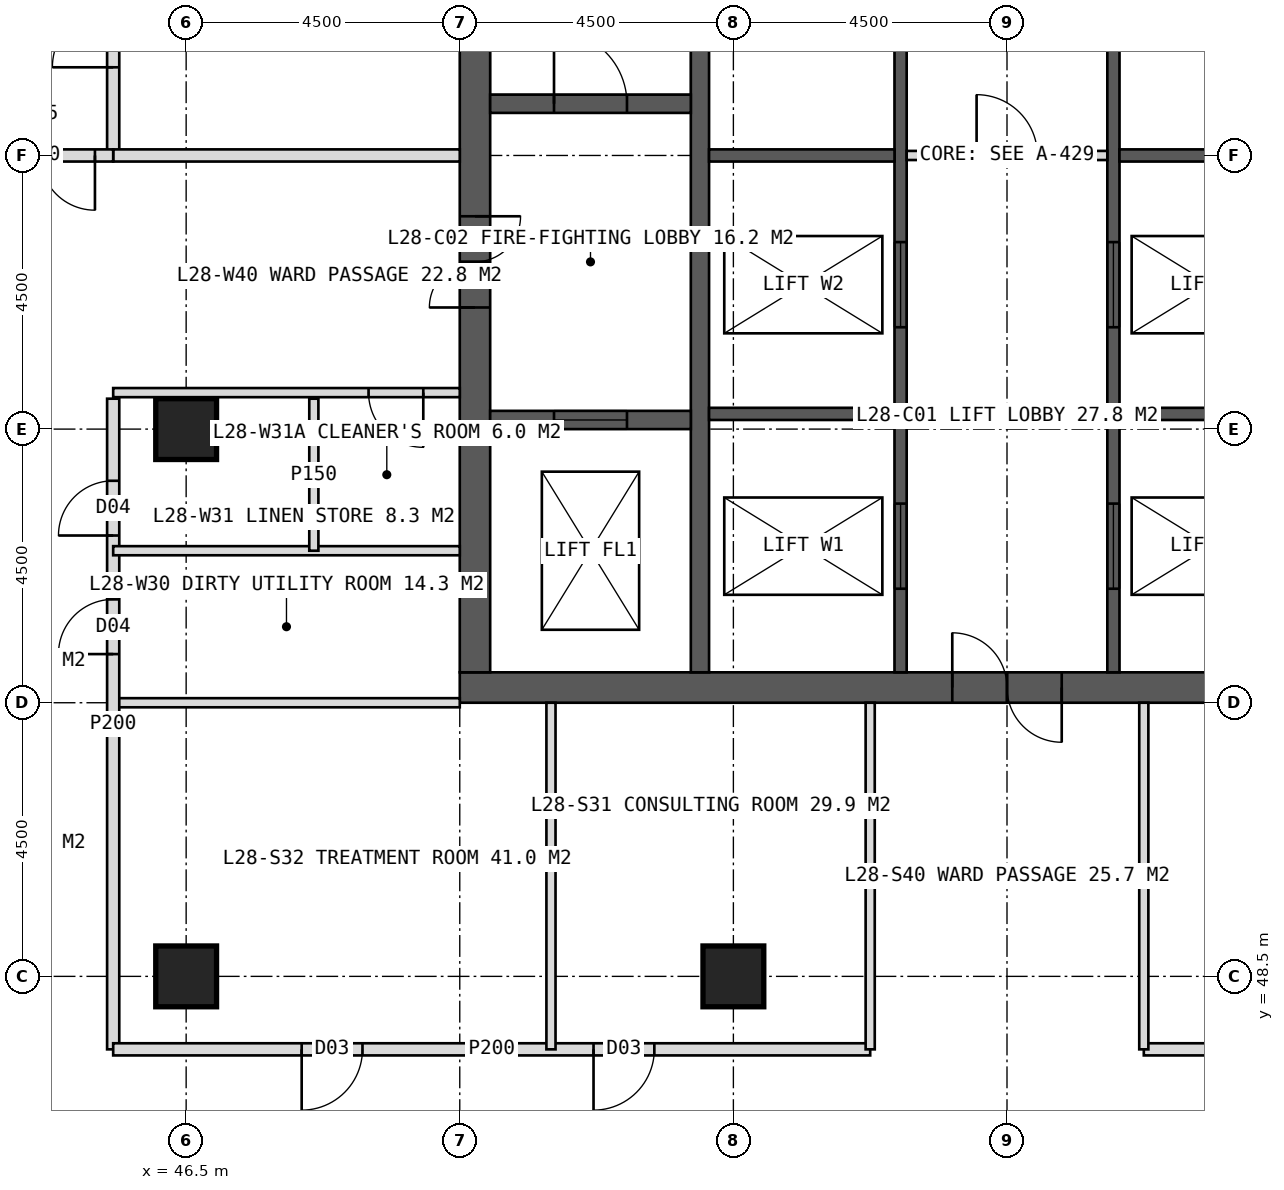
"""IFC4 building model, lengths in metres.
Left out: names, types, materials, properties, quantities, classifications, styles, units other than length and angle.
Written with IfcOpenShell. Run it as: python <this file> out.ifc"""

import sys

from ifc_helpers import new_model, si_unit, direction, frame, frame_2d, origin, origin_2d, place, context, subcontext, project, spatial, rectangle, hollow_rectangle, extrude, element, fill, save


model = new_model("IFC4")
c1 = context("Model", 3, precision=1e-05, world=origin(), true_north=direction((0.0, 1.0)))
c2 = subcontext(c1, "Body", "Model", "MODEL_VIEW")
j1 = project(units=[si_unit("LENGTHUNIT", "METRE"), si_unit("PLANEANGLEUNIT", "RADIAN")], contexts=[c1])
p1 = place(None, origin())
s1 = spatial("IfcSite", under=j1, at=p1, CompositionType="ELEMENT")
p2 = place(p1, origin())
s2 = spatial("IfcBuilding", under=s1, at=p2, CompositionType="ELEMENT")
p3 = place(p2, frame((0.0, 0.0, 120.0)))
s3 = spatial("IfcBuildingStorey", under=s2, at=p3, CompositionType="ELEMENT", Elevation=120.0)
p4 = place(p3, frame((51.0, 53.25, 0.0), z_axis=(0.0, 0.0, 1.0), x_axis=(1.0, 0.0, 0.0)))
e1 = element("IfcWall", 1, at=p4, inside=s3, PredefinedType="SHEAR", context=c2, shape_type="SweptSolid", body=[
    extrude(rectangle(XDim=18.0, YDim=0.5, at=frame_2d((9.0, 0.0))), origin(), (0.0, 0.0, 1.0), 4.0),
])
p5 = place(p4, frame((8.1, 0.0, 0.0)))
e2 = element("IfcOpeningElement", 2, at=p5, cuts=e1, PredefinedType="OPENING", context=c2, shape_type="SweptSolid", body=[
    extrude(rectangle(XDim=1.8, YDim=2.2, at=frame_2d((0.9, 1.1))), frame((0.0, 0.26, 0.0), z_axis=(0.0, -1.0, 0.0), x_axis=(1.0, 0.0, 0.0)), (0.0, 0.0, 1.0), 0.52),
])
p6 = place(p3, frame((51.25, 53.5, 0.0), z_axis=(0.0, 0.0, 1.0), x_axis=(0.0, 1.0, 0.0)))
e3 = element("IfcWall", 3, at=p6, inside=s3, PredefinedType="SHEAR", context=c2, shape_type="SweptSolid", body=[
    extrude(rectangle(XDim=17.0, YDim=0.5, at=frame_2d((8.5, 0.0))), origin(), (0.0, 0.0, 1.0), 4.0),
])
p7 = place(p6, frame((6.0, 0.0, 0.0)))
e4 = element("IfcOpeningElement", 4, at=p7, cuts=e3, PredefinedType="OPENING", context=c2, shape_type="SweptSolid", body=[
    extrude(rectangle(XDim=1.5, YDim=2.2, at=frame_2d((0.75, 1.1))), frame((0.0, 0.26, 0.0), z_axis=(0.0, -1.0, 0.0), x_axis=(1.0, 0.0, 0.0)), (0.0, 0.0, 1.0), 0.52),
])
p8 = place(p3, frame((54.95, 53.5, 0.0), z_axis=(0.0, 0.0, 1.0), x_axis=(0.0, 1.0, 0.0)))
e5 = element("IfcWall", 5, at=p8, inside=s3, PredefinedType="SHEAR", context=c2, shape_type="SweptSolid", body=[
    extrude(rectangle(XDim=17.0, YDim=0.3, at=frame_2d((8.5, 0.0))), origin(), (0.0, 0.0, 1.0), 4.0),
])
p9 = place(p3, frame((58.25, 53.5, 0.0), z_axis=(0.0, 0.0, 1.0), x_axis=(0.0, 1.0, 0.0)))
e6 = element("IfcWall", 6, at=p9, inside=s3, PredefinedType="SHEAR", context=c2, shape_type="SweptSolid", body=[
    extrude(rectangle(XDim=17.0, YDim=0.2, at=frame_2d((8.5, 0.0))), origin(), (0.0, 0.0, 1.0), 4.0),
])
p10 = place(p9, frame((1.375, 0.0, 0.0)))
e7 = element("IfcOpeningElement", 7, at=p10, cuts=e6, PredefinedType="OPENING", context=c2, shape_type="SweptSolid", body=[
    extrude(rectangle(XDim=1.4, YDim=2.2, at=frame_2d((0.7, 1.1))), frame((0.0, 0.11, 0.0), z_axis=(0.0, -1.0, 0.0), x_axis=(1.0, 0.0, 0.0)), (0.0, 0.0, 1.0), 0.22),
])
p11 = place(p9, frame((5.675, 0.0, 0.0)))
e8 = element("IfcOpeningElement", 8, at=p11, cuts=e6, PredefinedType="OPENING", context=c2, shape_type="SweptSolid", body=[
    extrude(rectangle(XDim=1.4, YDim=2.2, at=frame_2d((0.7, 1.1))), frame((0.0, 0.11, 0.0), z_axis=(0.0, -1.0, 0.0), x_axis=(1.0, 0.0, 0.0)), (0.0, 0.0, 1.0), 0.22),
])
p12 = place(p3, frame((61.75, 53.5, 0.0), z_axis=(0.0, 0.0, 1.0), x_axis=(0.0, 1.0, 0.0)))
e9 = element("IfcWall", 9, at=p12, inside=s3, PredefinedType="SHEAR", context=c2, shape_type="SweptSolid", body=[
    extrude(rectangle(XDim=17.0, YDim=0.2, at=frame_2d((8.5, 0.0))), origin(), (0.0, 0.0, 1.0), 4.0),
])
p13 = place(p12, frame((1.375, 0.0, 0.0)))
e10 = element("IfcOpeningElement", 10, at=p13, cuts=e9, PredefinedType="OPENING", context=c2, shape_type="SweptSolid", body=[
    extrude(rectangle(XDim=1.4, YDim=2.2, at=frame_2d((0.7, 1.1))), frame((0.0, 0.11, 0.0), z_axis=(0.0, -1.0, 0.0), x_axis=(1.0, 0.0, 0.0)), (0.0, 0.0, 1.0), 0.22),
])
p14 = place(p12, frame((5.675, 0.0, 0.0)))
e11 = element("IfcOpeningElement", 11, at=p14, cuts=e9, PredefinedType="OPENING", context=c2, shape_type="SweptSolid", body=[
    extrude(rectangle(XDim=1.4, YDim=2.2, at=frame_2d((0.7, 1.1))), frame((0.0, 0.11, 0.0), z_axis=(0.0, -1.0, 0.0), x_axis=(1.0, 0.0, 0.0)), (0.0, 0.0, 1.0), 0.22),
])
for number, where, z_axis, x_axis in (
    (12, (55.1, 57.75, 0.0), (0.0, 0.0, 1.0), (1.0, 0.0, 0.0)),
    (13, (61.85, 57.75, 0.0), (0.0, 0.0, 1.0), (1.0, 0.0, 0.0)),
    (14, (55.1, 62.0, 0.0), (0.0, 0.0, 1.0), (1.0, 0.0, 0.0)),
    (15, (61.85, 62.0, 0.0), (0.0, 0.0, 1.0), (1.0, 0.0, 0.0)),
):
    element("IfcWall", number, at=place(p3, frame(where, z_axis=z_axis, x_axis=x_axis)), inside=s3, PredefinedType="SHEAR", context=c2, shape_type="SweptSolid", body=[
        extrude(rectangle(XDim=3.05, YDim=0.2, at=frame_2d((1.525, 0.0))), origin(), (0.0, 0.0, 1.0), 4.0),
    ])
p15 = place(p3, frame((51.5, 62.85, 0.0), z_axis=(0.0, 0.0, 1.0), x_axis=(1.0, 0.0, 0.0)))
e16 = element("IfcWall", 16, at=p15, inside=s3, PredefinedType="SHEAR", context=c2, shape_type="SweptSolid", body=[
    extrude(rectangle(XDim=3.3, YDim=0.3, at=frame_2d((1.65, 0.0))), origin(), (0.0, 0.0, 1.0), 4.0),
])
p16 = place(p15, frame((1.05, 0.0, 0.0)))
e17 = element("IfcOpeningElement", 17, at=p16, cuts=e16, PredefinedType="OPENING", context=c2, shape_type="SweptSolid", body=[
    extrude(rectangle(XDim=1.2, YDim=2.1, at=frame_2d((0.6, 1.05))), frame((0.0, 0.16, 0.0), z_axis=(0.0, -1.0, 0.0), x_axis=(1.0, 0.0, 0.0)), (0.0, 0.0, 1.0), 0.32),
])
p17 = place(p3, frame((51.5, 57.65, 0.0), z_axis=(0.0, 0.0, 1.0), x_axis=(1.0, 0.0, 0.0)))
e18 = element("IfcWall", 18, at=p17, inside=s3, PredefinedType="SHEAR", context=c2, shape_type="SweptSolid", body=[
    extrude(rectangle(XDim=3.3, YDim=0.3, at=frame_2d((1.65, 0.0))), origin(), (0.0, 0.0, 1.0), 4.0),
])
p18 = place(p17, frame((1.05, 0.0, 0.0)))
e19 = element("IfcOpeningElement", 19, at=p18, cuts=e18, PredefinedType="OPENING", context=c2, shape_type="SweptSolid", body=[
    extrude(rectangle(XDim=1.2, YDim=2.2, at=frame_2d((0.6, 1.1))), frame((0.0, 0.16, 0.0), z_axis=(0.0, -1.0, 0.0), x_axis=(1.0, 0.0, 0.0)), (0.0, 0.0, 1.0), 0.32),
])
for number, where, z_axis, x_axis in (
    (20, (46.5, 48.5, 0.0), (0.0, 0.0, 1.0), (1.0, 0.0, 0.0)),
    (21, (55.5, 48.5, 0.0), (0.0, 0.0, 1.0), (1.0, 0.0, 0.0)),
    (22, (46.5, 57.5, 0.0), (0.0, 0.0, 1.0), (1.0, 0.0, 0.0)),
):
    element("IfcColumn", number, at=place(p3, frame(where, z_axis=z_axis, x_axis=x_axis)), inside=s3, PredefinedType="COLUMN", context=c2, shape_type="SweptSolid", body=[
        extrude(hollow_rectangle(XDim=1.0, YDim=1.0, WallThickness=0.1, at=origin_2d()), origin(), (0.0, 0.0, 1.0), 4.0),
    ])
p19 = place(p3, frame((51.0, 53.0, 0.0), z_axis=(0.0, 0.0, 1.0), x_axis=(-1.0, 0.0, 0.0)))
e23 = element("IfcWall", 23, at=p19, inside=s3, PredefinedType="PARTITIONING", context=c2, shape_type="SweptSolid", body=[
    extrude(rectangle(XDim=5.7, YDim=0.15, at=frame_2d((2.85, 0.0))), origin(), (0.0, 0.0, 1.0), 3.75),
])
p20 = place(p3, frame((45.3, 47.3, 0.0), z_axis=(0.0, 0.0, 1.0), x_axis=(0.0, 1.0, 0.0)))
e24 = element("IfcWall", 24, at=p20, inside=s3, PredefinedType="PARTITIONING", context=c2, shape_type="SweptSolid", body=[
    extrude(rectangle(XDim=10.7, YDim=0.2, at=frame_2d((5.35, 0.0))), origin(), (0.0, 0.0, 1.0), 3.75),
])
p21 = place(p20, frame((6.5, 0.0, 0.0)))
e25 = element("IfcOpeningElement", 25, at=p21, cuts=e24, PredefinedType="OPENING", context=c2, shape_type="SweptSolid", body=[
    extrude(rectangle(XDim=0.9, YDim=2.1, at=frame_2d((0.45, 1.05))), frame((0.0, 0.11, 0.0), z_axis=(0.0, -1.0, 0.0), x_axis=(1.0, 0.0, 0.0)), (0.0, 0.0, 1.0), 0.22),
])
p22 = place(p20, frame((8.45, 0.0, 0.0)))
e26 = element("IfcOpeningElement", 26, at=p22, cuts=e24, PredefinedType="OPENING", context=c2, shape_type="SweptSolid", body=[
    extrude(rectangle(XDim=0.9, YDim=2.1, at=frame_2d((0.45, 1.05))), frame((0.0, 0.11, 0.0), z_axis=(0.0, -1.0, 0.0), x_axis=(1.0, 0.0, 0.0)), (0.0, 0.0, 1.0), 0.22),
])
p23 = place(p3, frame((45.3, 62.0, 0.0), z_axis=(0.0, 0.0, 1.0), x_axis=(0.0, 1.0, 0.0)))
e27 = element("IfcWall", 27, at=p23, inside=s3, PredefinedType="PARTITIONING", context=c2, shape_type="SweptSolid", body=[
    extrude(rectangle(XDim=14.7, YDim=0.2, at=frame_2d((7.35, 0.0))), origin(), (0.0, 0.0, 1.0), 3.75),
])
p24 = place(p23, frame((1.45, 0.0, 0.0)))
e28 = element("IfcOpeningElement", 28, at=p24, cuts=e27, PredefinedType="OPENING", context=c2, shape_type="SweptSolid", body=[
    extrude(rectangle(XDim=1.0, YDim=2.1, at=frame_2d((0.5, 1.05))), frame((0.0, 0.11, 0.0), z_axis=(0.0, -1.0, 0.0), x_axis=(1.0, 0.0, 0.0)), (0.0, 0.0, 1.0), 0.22),
])
p25 = place(p23, frame((11.35, 0.0, 0.0)))
e29 = element("IfcOpeningElement", 29, at=p25, cuts=e27, PredefinedType="OPENING", context=c2, shape_type="SweptSolid", body=[
    extrude(rectangle(XDim=1.0, YDim=2.1, at=frame_2d((0.5, 1.05))), frame((0.0, 0.11, 0.0), z_axis=(0.0, -1.0, 0.0), x_axis=(1.0, 0.0, 0.0)), (0.0, 0.0, 1.0), 0.22),
])
p26 = place(p3, frame((51.0, 58.1, 0.0), z_axis=(0.0, 0.0, 1.0), x_axis=(-1.0, 0.0, 0.0)))
e30 = element("IfcWall", 30, at=p26, inside=s3, PredefinedType="PARTITIONING", context=c2, shape_type="SweptSolid", body=[
    extrude(rectangle(XDim=5.7, YDim=0.15, at=frame_2d((2.85, 0.0))), origin(), (0.0, 0.0, 1.0), 3.75),
])
p27 = place(p26, frame((0.6, 0.0, 0.0)))
e31 = element("IfcOpeningElement", 31, at=p27, cuts=e30, PredefinedType="OPENING", context=c2, shape_type="SweptSolid", body=[
    extrude(rectangle(XDim=0.9, YDim=2.1, at=frame_2d((0.45, 1.05))), frame((0.0, 0.085, 0.0), z_axis=(0.0, -1.0, 0.0), x_axis=(1.0, 0.0, 0.0)), (0.0, 0.0, 1.0), 0.17),
])
p28 = place(p3, frame((51.0, 62.0, 0.0), z_axis=(0.0, 0.0, 1.0), x_axis=(-1.0, 0.0, 0.0)))
e32 = element("IfcWall", 32, at=p28, inside=s3, PredefinedType="SOLIDWALL", context=c2, shape_type="SweptSolid", body=[
    extrude(rectangle(XDim=5.7, YDim=0.2, at=frame_2d((2.85, 0.0))), origin(), (0.0, 0.0, 1.0), 2.95),
])
p29 = place(p3, frame((51.0, 55.5, 0.0), z_axis=(0.0, 0.0, 1.0), x_axis=(-1.0, 0.0, 0.0)))
e33 = element("IfcWall", 33, at=p29, inside=s3, PredefinedType="PARTITIONING", context=c2, shape_type="SweptSolid", body=[
    extrude(rectangle(XDim=5.7, YDim=0.15, at=frame_2d((2.85, 0.0))), origin(), (0.0, 0.0, 1.0), 3.75),
])
p30 = place(p3, frame((48.6, 55.5, 0.0), z_axis=(0.0, 0.0, 1.0), x_axis=(0.0, 1.0, 0.0)))
e34 = element("IfcWall", 34, at=p30, inside=s3, PredefinedType="PARTITIONING", context=c2, shape_type="SweptSolid", body=[
    extrude(rectangle(XDim=2.5, YDim=0.15, at=frame_2d((1.25, 0.0))), origin(), (0.0, 0.0, 1.0), 3.75),
])
p31 = place(p3, frame((74.7, 47.3, 0.0), z_axis=(0.0, 0.0, 1.0), x_axis=(-1.0, 0.0, 0.0)))
e35 = element("IfcWall", 35, at=p31, inside=s3, PredefinedType="PARTITIONING", context=c2, shape_type="SweptSolid", body=[
    extrude(rectangle(XDim=12.45, YDim=0.2, at=frame_2d((6.225, 0.0))), origin(), (0.0, 0.0, 1.0), 3.75),
])
p32 = place(p31, frame((7.15, 0.0, 0.0)))
e36 = element("IfcOpeningElement", 36, at=p32, cuts=e35, PredefinedType="OPENING", context=c2, shape_type="SweptSolid", body=[
    extrude(rectangle(XDim=1.0, YDim=2.1, at=frame_2d((0.5, 1.05))), frame((0.0, 0.11, 0.0), z_axis=(0.0, -1.0, 0.0), x_axis=(1.0, 0.0, 0.0)), (0.0, 0.0, 1.0), 0.22),
])
p33 = place(p3, frame((57.75, 47.3, 0.0), z_axis=(0.0, 0.0, 1.0), x_axis=(-1.0, 0.0, 0.0)))
e37 = element("IfcWall", 37, at=p33, inside=s3, PredefinedType="PARTITIONING", context=c2, shape_type="SweptSolid", body=[
    extrude(rectangle(XDim=12.45, YDim=0.2, at=frame_2d((6.225, 0.0))), origin(), (0.0, 0.0, 1.0), 3.75),
])
p34 = place(p33, frame((3.55, 0.0, 0.0)))
e38 = element("IfcOpeningElement", 38, at=p34, cuts=e37, PredefinedType="OPENING", context=c2, shape_type="SweptSolid", body=[
    extrude(rectangle(XDim=1.0, YDim=2.1, at=frame_2d((0.5, 1.05))), frame((0.0, 0.11, 0.0), z_axis=(0.0, -1.0, 0.0), x_axis=(1.0, 0.0, 0.0)), (0.0, 0.0, 1.0), 0.22),
])
p35 = place(p33, frame((8.35, 0.0, 0.0)))
e39 = element("IfcOpeningElement", 39, at=p35, cuts=e37, PredefinedType="OPENING", context=c2, shape_type="SweptSolid", body=[
    extrude(rectangle(XDim=1.0, YDim=2.1, at=frame_2d((0.5, 1.05))), frame((0.0, 0.11, 0.0), z_axis=(0.0, -1.0, 0.0), x_axis=(1.0, 0.0, 0.0)), (0.0, 0.0, 1.0), 0.22),
])
for number, where, z_axis, x_axis in (
    (40, (62.25, 53.0, 0.0), (0.0, 0.0, 1.0), (0.0, -1.0, 0.0)),
    (41, (57.75, 53.0, 0.0), (0.0, 0.0, 1.0), (0.0, -1.0, 0.0)),
    (42, (52.5, 53.0, 0.0), (0.0, 0.0, 1.0), (0.0, -1.0, 0.0)),
):
    element("IfcWall", number, at=place(p3, frame(where, z_axis=z_axis, x_axis=x_axis)), inside=s3, PredefinedType="PARTITIONING", context=c2, shape_type="SweptSolid", body=[
        extrude(rectangle(XDim=5.7, YDim=0.15, at=frame_2d((2.85, 0.0))), origin(), (0.0, 0.0, 1.0), 3.75),
    ])
p36 = place(p3, frame((45.3, 62.0, 0.0), z_axis=(0.0, 0.0, 1.0), x_axis=(-1.0, 0.0, 0.0)))
e43 = element("IfcWall", 43, at=p36, inside=s3, PredefinedType="SOLIDWALL", context=c2, shape_type="SweptSolid", body=[
    extrude(rectangle(XDim=2.7, YDim=0.2, at=frame_2d((1.35, 0.0))), origin(), (0.0, 0.0, 1.0), 2.95),
])
p37 = place(p36, frame((0.3, 0.0, 0.0)))
e44 = element("IfcOpeningElement", 44, at=p37, cuts=e43, PredefinedType="OPENING", context=c2, shape_type="SweptSolid", body=[
    extrude(rectangle(XDim=1.8, YDim=2.2, at=frame_2d((0.9, 1.1))), frame((0.0, 0.11, 0.0), z_axis=(0.0, -1.0, 0.0), x_axis=(1.0, 0.0, 0.0)), (0.0, 0.0, 1.0), 0.22),
])
p38 = place(p3, frame((58.35, 62.0, 0.0), z_axis=(0.0, 0.0, 1.0), x_axis=(1.0, 0.0, 0.0)))
e45 = element("IfcWall", 45, at=p38, inside=s3, PredefinedType="PARTITIONING", context=c2, shape_type="SweptSolid", body=[
    extrude(rectangle(XDim=3.3, YDim=0.15, at=frame_2d((1.65, 0.0))), origin(), (0.0, 0.0, 1.0), 3.75),
])
p39 = place(p38, frame((1.15, 0.0, 0.0)))
e46 = element("IfcOpeningElement", 46, at=p39, cuts=e45, PredefinedType="OPENING", context=c2, shape_type="SweptSolid", body=[
    extrude(rectangle(XDim=1.0, YDim=2.1, at=frame_2d((0.5, 1.05))), frame((0.0, 0.085, 0.0), z_axis=(0.0, -1.0, 0.0), x_axis=(1.0, 0.0, 0.0)), (0.0, 0.0, 1.0), 0.17),
])
p40 = place(p21, origin())
e47 = element("IfcDoor", 47, at=p40, inside=s3, OperationType="SINGLE_SWING_LEFT", PredefinedType="DOOR", context=c2, shape_type="SweptSolid", body=[
    extrude(rectangle(XDim=0.9, YDim=2.1, at=frame_2d((0.45, 1.05))), frame((0.0, 0.025, 0.0), z_axis=(0.0, -1.0, 0.0), x_axis=(1.0, 0.0, 0.0)), (0.0, 0.0, 1.0), 0.05),
])
fill(e25, e47)
p41 = place(p27, origin())
e48 = element("IfcDoor", 48, at=p41, inside=s3, OperationType="SINGLE_SWING_LEFT", PredefinedType="DOOR", context=c2, shape_type="SweptSolid", body=[
    extrude(rectangle(XDim=0.9, YDim=2.1, at=frame_2d((0.45, 1.05))), frame((0.0, 0.025, 0.0), z_axis=(0.0, -1.0, 0.0), x_axis=(1.0, 0.0, 0.0)), (0.0, 0.0, 1.0), 0.05),
])
fill(e31, e48)
p42 = place(p22, origin())
e49 = element("IfcDoor", 49, at=p42, inside=s3, OperationType="SINGLE_SWING_LEFT", PredefinedType="DOOR", context=c2, shape_type="SweptSolid", body=[
    extrude(rectangle(XDim=0.9, YDim=2.1, at=frame_2d((0.45, 1.05))), frame((0.0, 0.025, 0.0), z_axis=(0.0, -1.0, 0.0), x_axis=(1.0, 0.0, 0.0)), (0.0, 0.0, 1.0), 0.05),
])
fill(e26, e49)
p43 = place(p24, origin())
e50 = element("IfcDoor", 50, at=p43, inside=s3, OperationType="SINGLE_SWING_LEFT", PredefinedType="DOOR", context=c2, shape_type="SweptSolid", body=[
    extrude(rectangle(XDim=1.0, YDim=2.1, at=frame_2d((0.5, 1.05))), frame((0.0, 0.025, 0.0), z_axis=(0.0, -1.0, 0.0), x_axis=(1.0, 0.0, 0.0)), (0.0, 0.0, 1.0), 0.05),
])
fill(e28, e50)
p44 = place(p34, origin())
e51 = element("IfcDoor", 51, at=p44, inside=s3, OperationType="SINGLE_SWING_RIGHT", PredefinedType="DOOR", context=c2, shape_type="SweptSolid", body=[
    extrude(rectangle(XDim=1.0, YDim=2.1, at=frame_2d((0.5, 1.05))), frame((0.0, 0.025, 0.0), z_axis=(0.0, -1.0, 0.0), x_axis=(1.0, 0.0, 0.0)), (0.0, 0.0, 1.0), 0.05),
])
fill(e38, e51)
p45 = place(p35, origin())
e52 = element("IfcDoor", 52, at=p45, inside=s3, OperationType="SINGLE_SWING_RIGHT", PredefinedType="DOOR", context=c2, shape_type="SweptSolid", body=[
    extrude(rectangle(XDim=1.0, YDim=2.1, at=frame_2d((0.5, 1.05))), frame((0.0, 0.025, 0.0), z_axis=(0.0, -1.0, 0.0), x_axis=(1.0, 0.0, 0.0)), (0.0, 0.0, 1.0), 0.05),
])
fill(e39, e52)
p46 = place(p37, origin())
e53 = element("IfcDoor", 53, at=p46, inside=s3, OperationType="DOUBLE_DOOR_DOUBLE_SWING", PredefinedType="DOOR", context=c2, shape_type="SweptSolid", body=[
    extrude(rectangle(XDim=1.8, YDim=2.2, at=frame_2d((0.9, 1.1))), frame((0.0, 0.025, 0.0), z_axis=(0.0, -1.0, 0.0), x_axis=(1.0, 0.0, 0.0)), (0.0, 0.0, 1.0), 0.05),
])
fill(e44, e53)
p47 = place(p5, origin())
e54 = element("IfcDoor", 54, at=p47, inside=s3, OperationType="DOUBLE_DOOR_SINGLE_SWING", PredefinedType="DOOR", context=c2, shape_type="SweptSolid", body=[
    extrude(rectangle(XDim=1.8, YDim=2.2, at=frame_2d((0.9, 1.1))), frame((0.0, 0.025, 0.0), z_axis=(0.0, -1.0, 0.0), x_axis=(1.0, 0.0, 0.0)), (0.0, 0.0, 1.0), 0.05),
])
fill(e2, e54)
p48 = place(p7, origin())
e55 = element("IfcDoor", 55, at=p48, inside=s3, OperationType="DOUBLE_DOOR_SINGLE_SWING", PredefinedType="DOOR", context=c2, shape_type="SweptSolid", body=[
    extrude(rectangle(XDim=1.5, YDim=2.2, at=frame_2d((0.75, 1.1))), frame((0.0, 0.025, 0.0), z_axis=(0.0, -1.0, 0.0), x_axis=(1.0, 0.0, 0.0)), (0.0, 0.0, 1.0), 0.05),
])
fill(e4, e55)
p49 = place(p16, origin())
e56 = element("IfcDoor", 56, at=p49, inside=s3, OperationType="SINGLE_SWING_LEFT", PredefinedType="DOOR", context=c2, shape_type="SweptSolid", body=[
    extrude(rectangle(XDim=1.2, YDim=2.1, at=frame_2d((0.6, 1.05))), frame((0.0, 0.025, 0.0), z_axis=(0.0, -1.0, 0.0), x_axis=(1.0, 0.0, 0.0)), (0.0, 0.0, 1.0), 0.05),
])
fill(e17, e56)
p50 = place(p18, origin())
e57 = element("IfcDoor", 57, at=p50, inside=s3, OperationType="SLIDING_TO_LEFT", PredefinedType="DOOR", context=c2, shape_type="SweptSolid", body=[
    extrude(rectangle(XDim=1.2, YDim=2.2, at=frame_2d((0.6, 1.1))), frame((0.0, 0.025, 0.0), z_axis=(0.0, -1.0, 0.0), x_axis=(1.0, 0.0, 0.0)), (0.0, 0.0, 1.0), 0.05),
])
fill(e19, e57)
p51 = place(p10, origin())
e58 = element("IfcDoor", 58, at=p51, inside=s3, OperationType="SLIDING_TO_LEFT", PredefinedType="DOOR", context=c2, shape_type="SweptSolid", body=[
    extrude(rectangle(XDim=1.4, YDim=2.2, at=frame_2d((0.7, 1.1))), frame((0.0, 0.025, 0.0), z_axis=(0.0, -1.0, 0.0), x_axis=(1.0, 0.0, 0.0)), (0.0, 0.0, 1.0), 0.05),
])
fill(e7, e58)
p52 = place(p13, origin())
e59 = element("IfcDoor", 59, at=p52, inside=s3, OperationType="SLIDING_TO_LEFT", PredefinedType="DOOR", context=c2, shape_type="SweptSolid", body=[
    extrude(rectangle(XDim=1.4, YDim=2.2, at=frame_2d((0.7, 1.1))), frame((0.0, 0.025, 0.0), z_axis=(0.0, -1.0, 0.0), x_axis=(1.0, 0.0, 0.0)), (0.0, 0.0, 1.0), 0.05),
])
fill(e10, e59)
p53 = place(p11, origin())
e60 = element("IfcDoor", 60, at=p53, inside=s3, OperationType="SLIDING_TO_LEFT", PredefinedType="DOOR", context=c2, shape_type="SweptSolid", body=[
    extrude(rectangle(XDim=1.4, YDim=2.2, at=frame_2d((0.7, 1.1))), frame((0.0, 0.025, 0.0), z_axis=(0.0, -1.0, 0.0), x_axis=(1.0, 0.0, 0.0)), (0.0, 0.0, 1.0), 0.05),
])
fill(e8, e60)
p54 = place(p14, origin())
e61 = element("IfcDoor", 61, at=p54, inside=s3, OperationType="SLIDING_TO_LEFT", PredefinedType="DOOR", context=c2, shape_type="SweptSolid", body=[
    extrude(rectangle(XDim=1.4, YDim=2.2, at=frame_2d((0.7, 1.1))), frame((0.0, 0.025, 0.0), z_axis=(0.0, -1.0, 0.0), x_axis=(1.0, 0.0, 0.0)), (0.0, 0.0, 1.0), 0.05),
])
fill(e11, e61)
p55 = place(p39, origin())
e62 = element("IfcDoor", 62, at=p55, inside=s3, OperationType="SINGLE_SWING_LEFT", PredefinedType="DOOR", context=c2, shape_type="SweptSolid", body=[
    extrude(rectangle(XDim=1.0, YDim=2.1, at=frame_2d((0.5, 1.05))), frame((0.0, 0.025, 0.0), z_axis=(0.0, -1.0, 0.0), x_axis=(1.0, 0.0, 0.0)), (0.0, 0.0, 1.0), 0.05),
])
fill(e46, e62)
save(model, sys.argv[1])
